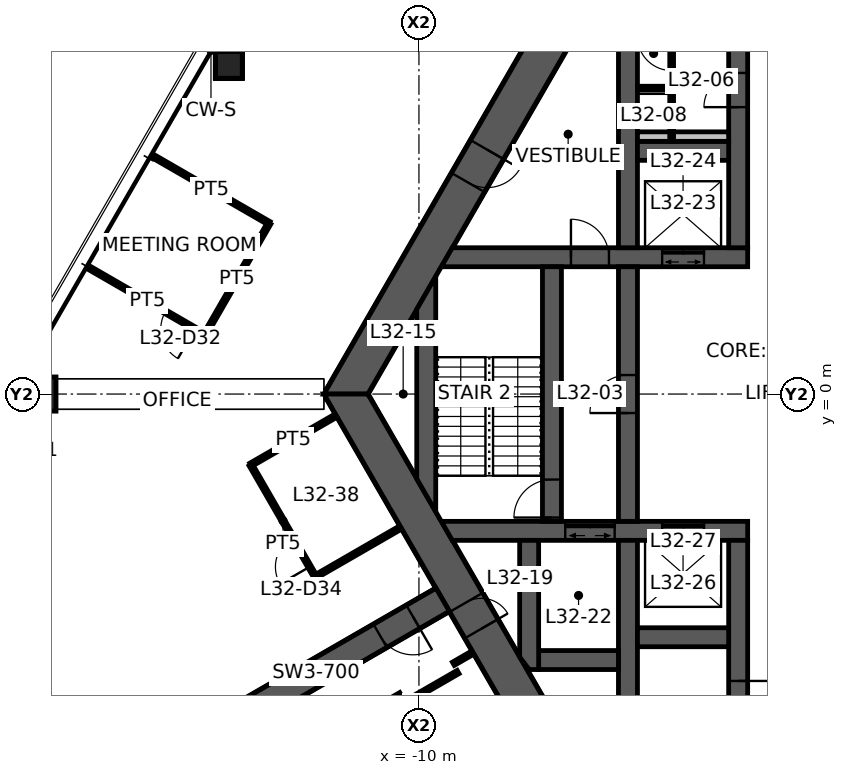
"""IFC4 building model, lengths in metres.
Left out: names, types, materials, properties, quantities, classifications, styles, units other than length and angle.
Written with IfcOpenShell. Run it as: python <this file> out.ifc"""

import sys

from ifc_helpers import new_model, si_unit, direction, frame, frame_2d, origin, origin_2d, place, context, subcontext, project, spatial, polyline, rectangle, hollow_rectangle, outline, extrude, element, fill, save


model = new_model("IFC4")
c1 = context("Model", 3, precision=1e-05, world=origin(), true_north=direction((0.0, 1.0)))
c2 = subcontext(c1, "Body", "Model", "MODEL_VIEW")
j1 = project(units=[si_unit("LENGTHUNIT", "METRE"), si_unit("PLANEANGLEUNIT", "RADIAN")], contexts=[c1])
p1 = place(None, origin())
s1 = spatial("IfcSite", under=j1, at=p1, CompositionType="ELEMENT")
p2 = place(p1, origin())
s2 = spatial("IfcBuilding", under=s1, at=p2, CompositionType="ELEMENT")
p3 = place(p2, frame((0.0, 0.0, 128.6)))
s3 = spatial("IfcBuildingStorey", under=s2, at=p3, CompositionType="ELEMENT", Elevation=128.6)
p4 = place(p3, frame((-20.0, 0.0, 0.0), z_axis=(0.0, 0.0, 1.0), x_axis=(1.0, 0.0, 0.0)))
e1 = element("IfcColumn", 1, at=p4, inside=s3, PredefinedType="COLUMN", context=c2, shape_type="SweptSolid", body=[
    extrude(hollow_rectangle(XDim=0.9, YDim=0.9, WallThickness=0.07, at=origin_2d()), origin(), (0.0, 0.0, 1.0), 4.5),
])
p5 = place(p3, frame((-15.0, 8.66, 0.0), z_axis=(0.0, 0.0, 1.0), x_axis=(1.0, 0.0, 0.0)))
e2 = element("IfcColumn", 2, at=p5, inside=s3, PredefinedType="COLUMN", context=c2, shape_type="SweptSolid", body=[
    extrude(hollow_rectangle(XDim=0.7, YDim=0.7, WallThickness=0.036, at=origin_2d()), origin(), (0.0, 0.0, 1.0), 4.5),
])
p6 = place(p3, frame((-5.961, 10.325, 0.0), z_axis=(0.0, 0.0, 1.0), x_axis=(-0.500004296715, -0.866022923061, 0.0)))
e3 = element("IfcWall", 3, at=p6, inside=s3, PredefinedType="SHEAR", context=c2, shape_type="SweptSolid", body=[
    extrude(outline(polyline([(-0.289, -0.5), (4.494, -0.5), (5.494, -0.5), (12.211, -0.5), (11.634, 0.5), (5.494, 0.5), (4.494, 0.5), (0.289, 0.5), (-0.289, -0.5)])), origin(), (0.0, 0.0, 1.0), 4.5),
])
p7 = place(p6, frame((4.494, 0.0, 0.0)))
e4 = element("IfcOpeningElement", 4, at=p7, cuts=e3, PredefinedType="OPENING", context=c2, shape_type="SweptSolid", body=[
    extrude(rectangle(XDim=1.0, YDim=2.1, at=frame_2d((0.5, 1.05))), frame((0.0, 0.51, 0.0), z_axis=(0.0, -1.0, 0.0), x_axis=(1.0, 0.0, 0.0)), (0.0, 0.0, 1.0), 1.02),
])
p8 = place(p3, frame((-11.922, 0.0, 0.0), z_axis=(0.0, 0.0, 1.0), x_axis=(0.500004296715, -0.866022923061, 0.0)))
e5 = element("IfcWall", 5, at=p8, inside=s3, PredefinedType="SHEAR", context=c2, shape_type="SweptSolid", body=[
    extrude(outline(polyline([(-0.289, -0.5), (6.331, -0.5), (7.131, -0.5), (12.211, -0.5), (11.634, 0.5), (7.131, 0.5), (6.331, 0.5), (0.289, 0.5), (-0.289, -0.5)])), origin(), (0.0, 0.0, 1.0), 4.5),
])
p9 = place(p8, frame((6.331, 0.0, 0.0)))
e6 = element("IfcOpeningElement", 6, at=p9, cuts=e5, PredefinedType="OPENING", context=c2, shape_type="SweptSolid", body=[
    extrude(rectangle(XDim=0.8, YDim=2.1, at=frame_2d((0.4, 1.05))), frame((0.0, 0.51, 0.0), z_axis=(0.0, -1.0, 0.0), x_axis=(1.0, 0.0, 0.0)), (0.0, 0.0, 1.0), 1.02),
])
p10 = place(p3, frame((-9.375, -5.413, 0.0), z_axis=(0.0, 0.0, 1.0), x_axis=(-0.866032377459, -0.499987921047, 0.0)))
e7 = element("IfcWall", 7, at=p10, inside=s3, PredefinedType="SHEAR", context=c2, shape_type="SweptSolid", body=[
    extrude(rectangle(XDim=7.696, YDim=0.7, at=frame_2d((3.848, 0.0))), origin(), (0.0, 0.0, 1.0), 4.5),
])
p11 = place(p10, frame((0.9, 0.0, 0.0)))
e8 = element("IfcOpeningElement", 8, at=p11, cuts=e7, PredefinedType="OPENING", context=c2, shape_type="SweptSolid", body=[
    extrude(rectangle(XDim=1.0, YDim=2.1, at=frame_2d((0.5, 1.05))), frame((0.0, 0.36, 0.0), z_axis=(0.0, -1.0, 0.0), x_axis=(1.0, 0.0, 0.0)), (0.0, 0.0, 1.0), 0.72),
])
p12 = place(p3, frame((-9.266, 3.6, 0.0), z_axis=(0.0, 0.0, 1.0), x_axis=(1.0, 0.0, 0.0)))
e9 = element("IfcWall", 9, at=p12, inside=s3, PredefinedType="SHEAR", context=c2, shape_type="SweptSolid", body=[
    extrude(outline(polyline([(-0.144, -0.25), (3.266, -0.25), (4.266, -0.25), (5.667, -0.25), (6.767, -0.25), (7.916, -0.25), (7.916, 0.25), (6.767, 0.25), (5.667, 0.25), (4.266, 0.25), (3.266, 0.25), (0.144, 0.25), (-0.144, -0.25)])), origin(), (0.0, 0.0, 1.0), 4.5),
])
p13 = place(p12, frame((3.266, 0.0, 0.0)))
e10 = element("IfcOpeningElement", 10, at=p13, cuts=e9, PredefinedType="OPENING", context=c2, shape_type="SweptSolid", body=[
    extrude(rectangle(XDim=1.0, YDim=2.1, at=frame_2d((0.5, 1.05))), frame((0.0, 0.26, 0.0), z_axis=(0.0, -1.0, 0.0), x_axis=(1.0, 0.0, 0.0)), (0.0, 0.0, 1.0), 0.52),
])
p14 = place(p12, frame((5.667, 0.0, 0.0)))
e11 = element("IfcOpeningElement", 11, at=p14, cuts=e9, PredefinedType="OPENING", context=c2, shape_type="SweptSolid", body=[
    extrude(rectangle(XDim=1.1, YDim=2.1, at=frame_2d((0.55, 1.05))), frame((0.0, 0.26, 0.0), z_axis=(0.0, -1.0, 0.0), x_axis=(1.0, 0.0, 0.0)), (0.0, 0.0, 1.0), 0.52),
])
p15 = place(p3, frame((-9.266, -3.6, 0.0), z_axis=(0.0, 0.0, 1.0), x_axis=(1.0, 0.0, 0.0)))
e12 = element("IfcWall", 12, at=p15, inside=s3, PredefinedType="SHEAR", context=c2, shape_type="SweptSolid", body=[
    extrude(outline(polyline([(0.144, -0.25), (3.116, -0.25), (4.417, -0.25), (5.667, -0.25), (6.767, -0.25), (7.916, -0.25), (7.916, 0.25), (6.767, 0.25), (5.667, 0.25), (4.417, 0.25), (3.116, 0.25), (-0.144, 0.25), (0.144, -0.25)])), origin(), (0.0, 0.0, 1.0), 4.5),
])
p16 = place(p15, frame((5.667, 0.0, 0.0)))
e13 = element("IfcOpeningElement", 13, at=p16, cuts=e12, PredefinedType="OPENING", context=c2, shape_type="SweptSolid", body=[
    extrude(rectangle(XDim=1.1, YDim=2.1, at=frame_2d((0.55, 1.05))), frame((0.0, 0.26, 0.0), z_axis=(0.0, -1.0, 0.0), x_axis=(1.0, 0.0, 0.0)), (0.0, 0.0, 1.0), 0.52),
])
p17 = place(p15, frame((3.116, 0.0, 0.0)))
e14 = element("IfcOpeningElement", 14, at=p17, cuts=e12, PredefinedType="OPENING", context=c2, shape_type="SweptSolid", body=[
    extrude(rectangle(XDim=1.3, YDim=2.1, at=frame_2d((0.65, 1.05))), frame((0.0, 0.26, 0.0), z_axis=(0.0, -1.0, 0.0), x_axis=(1.0, 0.0, 0.0)), (0.0, 0.0, 1.0), 0.52),
])
p18 = place(p3, frame((-1.6, 3.85, 0.0), z_axis=(0.0, 0.0, 1.0), x_axis=(0.0, 1.0, 0.0)))
e15 = element("IfcWall", 15, at=p18, inside=s3, PredefinedType="SHEAR", context=c2, shape_type="SweptSolid", body=[
    extrude(rectangle(XDim=5.975, YDim=0.5, at=frame_2d((2.987, 0.0))), origin(), (0.0, 0.0, 1.0), 4.5),
])
p19 = place(p18, frame((3.7, 0.0, 0.0)))
e16 = element("IfcOpeningElement", 16, at=p19, cuts=e15, PredefinedType="OPENING", context=c2, shape_type="SweptSolid", body=[
    extrude(rectangle(XDim=0.9, YDim=2.1, at=frame_2d((0.45, 1.05))), frame((0.0, 0.26, 0.0), z_axis=(0.0, -1.0, 0.0), x_axis=(1.0, 0.0, 0.0)), (0.0, 0.0, 1.0), 0.52),
])
p20 = place(p3, frame((-1.6, -3.85, 0.0), z_axis=(0.0, 0.0, 1.0), x_axis=(0.0, -1.0, 0.0)))
e17 = element("IfcWall", 17, at=p20, inside=s3, PredefinedType="SHEAR", context=c2, shape_type="SweptSolid", body=[
    extrude(rectangle(XDim=5.975, YDim=0.5, at=frame_2d((2.987, 0.0))), origin(), (0.0, 0.0, 1.0), 4.5),
])
p21 = place(p20, frame((3.7, 0.0, 0.0)))
e18 = element("IfcOpeningElement", 18, at=p21, cuts=e17, PredefinedType="OPENING", context=c2, shape_type="SweptSolid", body=[
    extrude(rectangle(XDim=0.9, YDim=2.1, at=frame_2d((0.45, 1.05))), frame((0.0, 0.26, 0.0), z_axis=(0.0, -1.0, 0.0), x_axis=(1.0, 0.0, 0.0)), (0.0, 0.0, 1.0), 0.52),
])
p22 = place(p3, frame((-4.5, -3.35, 0.0), z_axis=(0.0, 0.0, 1.0), x_axis=(0.0, 1.0, 0.0)))
e19 = element("IfcWall", 19, at=p22, inside=s3, PredefinedType="SHEAR", context=c2, shape_type="SweptSolid", body=[
    extrude(rectangle(XDim=6.7, YDim=0.5, at=frame_2d((3.35, 0.0))), origin(), (0.0, 0.0, 1.0), 4.5),
])
p23 = place(p22, frame((2.85, 0.0, 0.0)))
e20 = element("IfcOpeningElement", 20, at=p23, cuts=e19, PredefinedType="OPENING", context=c2, shape_type="SweptSolid", body=[
    extrude(rectangle(XDim=1.0, YDim=2.1, at=frame_2d((0.5, 1.05))), frame((0.0, 0.26, 0.0), z_axis=(0.0, -1.0, 0.0), x_axis=(1.0, 0.0, 0.0)), (0.0, 0.0, 1.0), 0.52),
])
p24 = place(p3, frame((-6.5, -3.35, 0.0), z_axis=(0.0, 0.0, 1.0), x_axis=(0.0, 1.0, 0.0)))
e21 = element("IfcWall", 21, at=p24, inside=s3, PredefinedType="SHEAR", context=c2, shape_type="SweptSolid", body=[
    extrude(rectangle(XDim=6.7, YDim=0.5, at=frame_2d((3.35, 0.0))), origin(), (0.0, 0.0, 1.0), 4.5),
])
p25 = place(p24, frame((0.1, 0.0, 0.0)))
e22 = element("IfcOpeningElement", 22, at=p25, cuts=e21, PredefinedType="OPENING", context=c2, shape_type="SweptSolid", body=[
    extrude(rectangle(XDim=1.0, YDim=2.1, at=frame_2d((0.5, 1.05))), frame((0.0, 0.26, 0.0), z_axis=(0.0, -1.0, 0.0), x_axis=(1.0, 0.0, 0.0)), (0.0, 0.0, 1.0), 0.52),
])
for number, where, z_axis, x_axis in (
    (23, (-4.5, 3.85, 0.0), (0.0, 0.0, 1.0), (0.0, 1.0, 0.0)),
    (24, (-4.5, -3.85, 0.0), (0.0, 0.0, 1.0), (0.0, -1.0, 0.0)),
):
    element("IfcWall", number, at=place(p3, frame(where, z_axis=z_axis, x_axis=x_axis)), inside=s3, PredefinedType="SHEAR", context=c2, shape_type="SweptSolid", body=[
        extrude(rectangle(XDim=5.975, YDim=0.5, at=frame_2d((2.987, 0.0))), origin(), (0.0, 0.0, 1.0), 4.5),
    ])
for number, where, z_axis, x_axis in (
    (25, (-4.25, 6.4, 0.0), (0.0, 0.0, 1.0), (1.0, 0.0, 0.0)),
    (26, (-4.25, -6.4, 0.0), (0.0, 0.0, 1.0), (1.0, 0.0, 0.0)),
):
    element("IfcWall", number, at=place(p3, frame(where, z_axis=z_axis, x_axis=x_axis)), inside=s3, PredefinedType="SHEAR", context=c2, shape_type="SweptSolid", body=[
        extrude(rectangle(XDim=2.4, YDim=0.5, at=frame_2d((1.2, 0.0))), origin(), (0.0, 0.0, 1.0), 4.5),
    ])
p26 = place(p3, frame((-6.85, -7.0, 0.0), z_axis=(0.0, 0.0, 1.0), x_axis=(1.0, 0.0, 0.0)))
e27 = element("IfcWall", 27, at=p26, inside=s3, PredefinedType="SHEAR", context=c2, shape_type="SweptSolid", body=[
    extrude(rectangle(XDim=2.1, YDim=0.5, at=frame_2d((1.05, 0.0))), origin(), (0.0, 0.0, 1.0), 4.5),
])
p27 = place(p3, frame((-7.1, -3.85, 0.0), z_axis=(0.0, 0.0, 1.0), x_axis=(0.0, -1.0, 0.0)))
e28 = element("IfcWall", 28, at=p27, inside=s3, PredefinedType="SHEAR", context=c2, shape_type="SweptSolid", body=[
    extrude(outline(polyline([(0.0, -0.25), (3.069, -0.25), (3.4, 0.0), (3.4, 0.25), (0.0, 0.25), (0.0, -0.25)])), origin(), (0.0, 0.0, 1.0), 4.5),
])
p28 = place(p3, frame((-9.808, -2.662, 0.0), z_axis=(0.0, 0.0, 1.0), x_axis=(0.0, 1.0, 0.0)))
e29 = element("IfcWall", 29, at=p28, inside=s3, PredefinedType="SHEAR", context=c2, shape_type="SweptSolid", body=[
    extrude(outline(polyline([(-0.433, -0.25), (5.758, -0.25), (4.892, 0.25), (0.433, 0.25), (-0.433, -0.25)])), origin(), (0.0, 0.0, 1.0), 4.5),
])
p29 = place(p3, frame((-4.25, 6.775, 0.0), z_axis=(0.0, 0.0, 1.0), x_axis=(1.0, 0.0, 0.0)))
e30 = element("IfcWall", 30, at=p29, inside=s3, PredefinedType="PLUMBINGWALL", context=c2, shape_type="SweptSolid", body=[
    extrude(rectangle(XDim=2.4, YDim=0.25, at=frame_2d((1.2, 0.0))), origin(), (0.0, 0.0, 1.0), 4.5),
])
p30 = place(p3, frame((-3.35, 6.65, 0.0), z_axis=(0.0, 0.0, 1.0), x_axis=(0.0, 1.0, 0.0)))
e31 = element("IfcWall", 31, at=p30, inside=s3, PredefinedType="PARTITIONING", context=c2, shape_type="SweptSolid", body=[
    extrude(rectangle(XDim=3.175, YDim=0.1, at=frame_2d((1.587, 0.0))), origin(), (0.0, 0.0, 1.0), 3.55),
])
p31 = place(p30, frame((1.863, 0.0, 0.0)))
e32 = element("IfcOpeningElement", 32, at=p31, cuts=e31, PredefinedType="OPENING", context=c2, shape_type="SweptSolid", body=[
    extrude(rectangle(XDim=0.9, YDim=2.1, at=frame_2d((0.45, 1.05))), frame((0.0, 0.06, 0.0), z_axis=(0.0, -1.0, 0.0), x_axis=(1.0, 0.0, 0.0)), (0.0, 0.0, 1.0), 0.12),
])
p32 = place(p30, frame((0.35, 0.0, 0.0)))
e33 = element("IfcOpeningElement", 33, at=p32, cuts=e31, PredefinedType="OPENING", context=c2, shape_type="SweptSolid", body=[
    extrude(rectangle(XDim=0.9, YDim=2.1, at=frame_2d((0.45, 1.05))), frame((0.0, 0.06, 0.0), z_axis=(0.0, -1.0, 0.0), x_axis=(1.0, 0.0, 0.0)), (0.0, 0.0, 1.0), 0.12),
])
p33 = place(p3, frame((-3.4, 8.05, 0.0), z_axis=(0.0, 0.0, 1.0), x_axis=(-1.0, 0.0, 0.0)))
e34 = element("IfcWall", 34, at=p33, inside=s3, PredefinedType="PARTITIONING", context=c2, shape_type="SweptSolid", body=[
    extrude(rectangle(XDim=0.85, YDim=0.1, at=frame_2d((0.425, 0.0))), origin(), (0.0, 0.0, 1.0), 3.55),
])
p34 = place(p3, frame((-16.988, 6.255, 0.0), z_axis=(0.0, 0.0, 1.0), x_axis=(0.866009963213, -0.5000267429, 0.0)))
e35 = element("IfcWall", 35, at=p34, inside=s3, PredefinedType="PARTITIONING", context=c2, shape_type="SweptSolid", body=[
    extrude(rectangle(XDim=3.519, YDim=0.1, at=frame_2d((1.759, 0.0))), origin(), (0.0, 0.0, 1.0), 3.55),
])
p35 = place(p3, frame((-15.633, 1.565, 0.0), z_axis=(0.0, 0.0, 1.0), x_axis=(-0.866034097932, 0.499984940993, 0.0)))
e36 = element("IfcWall", 36, at=p35, inside=s3, PredefinedType="PARTITIONING", context=c2, shape_type="SweptSolid", body=[
    extrude(rectangle(XDim=3.489, YDim=0.1, at=frame_2d((1.744, 0.0))), origin(), (0.0, 0.0, 1.0), 3.55),
])
p36 = place(p35, frame((0.3, 0.0, 0.0)))
e37 = element("IfcOpeningElement", 37, at=p36, cuts=e36, PredefinedType="OPENING", context=c2, shape_type="SweptSolid", body=[
    extrude(rectangle(XDim=0.9, YDim=2.1, at=frame_2d((0.45, 1.05))), frame((0.0, 0.06, 0.0), z_axis=(0.0, -1.0, 0.0), x_axis=(1.0, 0.0, 0.0)), (0.0, 0.0, 1.0), 0.12),
])
p37 = place(p3, frame((-13.941, 4.495, 0.0), z_axis=(0.0, 0.0, 1.0), x_axis=(-0.500003502126, -0.866023381821, 0.0)))
e38 = element("IfcWall", 38, at=p37, inside=s3, PredefinedType="PARTITIONING", context=c2, shape_type="SweptSolid", body=[
    extrude(rectangle(XDim=3.384, YDim=0.1, at=frame_2d((1.692, 0.0))), origin(), (0.0, 0.0, 1.0), 3.55),
])
p38 = place(p3, frame((-14.427, -1.863, 0.0), z_axis=(0.0, 0.0, 1.0), x_axis=(0.866045356598, 0.49996543912, 0.0)))
e39 = element("IfcWall", 39, at=p38, inside=s3, PredefinedType="PARTITIONING", context=c2, shape_type="SweptSolid", body=[
    extrude(rectangle(XDim=2.58, YDim=0.1, at=frame_2d((1.29, 0.0))), origin(), (0.0, 0.0, 1.0), 3.55),
])
p39 = place(p3, frame((-12.726, -4.807, 0.0), z_axis=(0.0, 0.0, 1.0), x_axis=(-0.500062241894, 0.865989465428, 0.0)))
e40 = element("IfcWall", 40, at=p39, inside=s3, PredefinedType="PARTITIONING", context=c2, shape_type="SweptSolid", body=[
    extrude(rectangle(XDim=3.4, YDim=0.1, at=frame_2d((1.7, 0.0))), origin(), (0.0, 0.0, 1.0), 3.55),
])
p40 = place(p39, frame((0.3, 0.0, 0.0)))
e41 = element("IfcOpeningElement", 41, at=p40, cuts=e40, PredefinedType="OPENING", context=c2, shape_type="SweptSolid", body=[
    extrude(rectangle(XDim=0.9, YDim=2.1, at=frame_2d((0.45, 1.05))), frame((0.0, 0.06, 0.0), z_axis=(0.0, -1.0, 0.0), x_axis=(1.0, 0.0, 0.0)), (0.0, 0.0, 1.0), 0.12),
])
p41 = place(p3, frame((-10.492, -3.517, 0.0), z_axis=(0.0, 0.0, 1.0), x_axis=(-0.866021702275, -0.500006411147, 0.0)))
e42 = element("IfcWall", 42, at=p41, inside=s3, PredefinedType="PARTITIONING", context=c2, shape_type="SweptSolid", body=[
    extrude(rectangle(XDim=2.58, YDim=0.1, at=frame_2d((1.29, 0.0))), origin(), (0.0, 0.0, 1.0), 3.55),
])
p42 = place(p3, frame((-11.0, -8.198, 0.0), z_axis=(0.0, 0.0, 1.0), x_axis=(0.866131372301, 0.499816412211, 0.0)))
e43 = element("IfcWall", 43, at=p42, inside=s3, PredefinedType="PARTITIONING", context=c2, shape_type="SweptSolid", body=[
    extrude(rectangle(XDim=0.6, YDim=0.1, at=frame_2d((0.3, 0.0))), origin(), (0.0, 0.0, 1.0), 3.55),
])
p43 = place(p3, frame((-10.355, -8.115, 0.0), z_axis=(0.0, 0.0, 1.0), x_axis=(0.866094119867, 0.499880961361, 0.0)))
e44 = element("IfcWall", 44, at=p43, inside=s3, PredefinedType="PARTITIONING", context=c2, shape_type="SweptSolid", body=[
    extrude(rectangle(XDim=1.6, YDim=0.1, at=frame_2d((0.8, 0.0))), origin(), (0.0, 0.0, 1.0), 3.55),
])
p44 = place(p3, frame((-9.094, -7.098, 0.0), z_axis=(0.0, 0.0, 1.0), x_axis=(0.865954211699, 0.50012328804, 0.0)))
e45 = element("IfcWall", 45, at=p44, inside=s3, PredefinedType="PARTITIONING", context=c2, shape_type="SweptSolid", body=[
    extrude(rectangle(XDim=0.58, YDim=0.1, at=frame_2d((0.29, 0.0))), origin(), (0.0, 0.0, 1.0), 3.55),
])
p45 = place(p9, origin())
e46 = element("IfcDoor", 46, at=p45, inside=s3, OperationType="SINGLE_SWING_RIGHT", PredefinedType="DOOR", context=c2, shape_type="SweptSolid", body=[
    extrude(rectangle(XDim=0.8, YDim=2.1, at=frame_2d((0.4, 1.05))), frame((0.0, 0.025, 0.0), z_axis=(0.0, -1.0, 0.0), x_axis=(1.0, 0.0, 0.0)), (0.0, 0.0, 1.0), 0.05),
])
fill(e6, e46)
p46 = place(p7, origin())
e47 = element("IfcDoor", 47, at=p46, inside=s3, OperationType="SINGLE_SWING_LEFT", PredefinedType="DOOR", context=c2, shape_type="SweptSolid", body=[
    extrude(rectangle(XDim=1.0, YDim=2.1, at=frame_2d((0.5, 1.05))), frame((0.0, 0.025, 0.0), z_axis=(0.0, -1.0, 0.0), x_axis=(1.0, 0.0, 0.0)), (0.0, 0.0, 1.0), 0.05),
])
fill(e4, e47)
p47 = place(p23, origin())
e48 = element("IfcDoor", 48, at=p47, inside=s3, OperationType="SINGLE_SWING_LEFT", PredefinedType="DOOR", context=c2, shape_type="SweptSolid", body=[
    extrude(rectangle(XDim=1.0, YDim=2.1, at=frame_2d((0.5, 1.05))), frame((0.0, 0.025, 0.0), z_axis=(0.0, -1.0, 0.0), x_axis=(1.0, 0.0, 0.0)), (0.0, 0.0, 1.0), 0.05),
])
fill(e20, e48)
p48 = place(p25, origin())
e49 = element("IfcDoor", 49, at=p48, inside=s3, OperationType="SINGLE_SWING_LEFT", PredefinedType="DOOR", context=c2, shape_type="SweptSolid", body=[
    extrude(rectangle(XDim=1.0, YDim=2.1, at=frame_2d((0.5, 1.05))), frame((0.0, 0.025, 0.0), z_axis=(0.0, -1.0, 0.0), x_axis=(1.0, 0.0, 0.0)), (0.0, 0.0, 1.0), 0.05),
])
fill(e22, e49)
p49 = place(p13, origin())
e50 = element("IfcDoor", 50, at=p49, inside=s3, OperationType="SINGLE_SWING_LEFT", PredefinedType="DOOR", context=c2, shape_type="SweptSolid", body=[
    extrude(rectangle(XDim=1.0, YDim=2.1, at=frame_2d((0.5, 1.05))), frame((0.0, 0.025, 0.0), z_axis=(0.0, -1.0, 0.0), x_axis=(1.0, 0.0, 0.0)), (0.0, 0.0, 1.0), 0.05),
])
fill(e10, e50)
p50 = place(p19, origin())
e51 = element("IfcDoor", 51, at=p50, inside=s3, OperationType="SINGLE_SWING_LEFT", PredefinedType="DOOR", context=c2, shape_type="SweptSolid", body=[
    extrude(rectangle(XDim=0.9, YDim=2.1, at=frame_2d((0.45, 1.05))), frame((0.0, 0.025, 0.0), z_axis=(0.0, -1.0, 0.0), x_axis=(1.0, 0.0, 0.0)), (0.0, 0.0, 1.0), 0.05),
])
fill(e16, e51)
p51 = place(p21, origin())
e52 = element("IfcDoor", 52, at=p51, inside=s3, OperationType="SINGLE_SWING_LEFT", PredefinedType="DOOR", context=c2, shape_type="SweptSolid", body=[
    extrude(rectangle(XDim=0.9, YDim=2.1, at=frame_2d((0.45, 1.05))), frame((0.0, 0.025, 0.0), z_axis=(0.0, -1.0, 0.0), x_axis=(1.0, 0.0, 0.0)), (0.0, 0.0, 1.0), 0.05),
])
fill(e18, e52)
p52 = place(p11, origin())
e53 = element("IfcDoor", 53, at=p52, inside=s3, OperationType="SINGLE_SWING_LEFT", PredefinedType="DOOR", context=c2, shape_type="SweptSolid", body=[
    extrude(rectangle(XDim=1.0, YDim=2.1, at=frame_2d((0.5, 1.05))), frame((0.0, 0.025, 0.0), z_axis=(0.0, -1.0, 0.0), x_axis=(1.0, 0.0, 0.0)), (0.0, 0.0, 1.0), 0.05),
])
fill(e8, e53)
p53 = place(p31, origin())
e54 = element("IfcDoor", 54, at=p53, inside=s3, OperationType="SINGLE_SWING_RIGHT", PredefinedType="DOOR", context=c2, shape_type="SweptSolid", body=[
    extrude(rectangle(XDim=0.9, YDim=2.1, at=frame_2d((0.45, 1.05))), frame((0.0, 0.025, 0.0), z_axis=(0.0, -1.0, 0.0), x_axis=(1.0, 0.0, 0.0)), (0.0, 0.0, 1.0), 0.05),
])
fill(e32, e54)
p54 = place(p32, origin())
e55 = element("IfcDoor", 55, at=p54, inside=s3, OperationType="SINGLE_SWING_RIGHT", PredefinedType="DOOR", context=c2, shape_type="SweptSolid", body=[
    extrude(rectangle(XDim=0.9, YDim=2.1, at=frame_2d((0.45, 1.05))), frame((0.0, 0.025, 0.0), z_axis=(0.0, -1.0, 0.0), x_axis=(1.0, 0.0, 0.0)), (0.0, 0.0, 1.0), 0.05),
])
fill(e33, e55)
p55 = place(p36, origin())
e56 = element("IfcDoor", 56, at=p55, inside=s3, OperationType="SINGLE_SWING_LEFT", PredefinedType="DOOR", context=c2, shape_type="SweptSolid", body=[
    extrude(rectangle(XDim=0.9, YDim=2.1, at=frame_2d((0.45, 1.05))), frame((0.0, 0.025, 0.0), z_axis=(0.0, -1.0, 0.0), x_axis=(1.0, 0.0, 0.0)), (0.0, 0.0, 1.0), 0.05),
])
fill(e37, e56)
p56 = place(p40, origin())
e57 = element("IfcDoor", 57, at=p56, inside=s3, OperationType="SINGLE_SWING_LEFT", PredefinedType="DOOR", context=c2, shape_type="SweptSolid", body=[
    extrude(rectangle(XDim=0.9, YDim=2.1, at=frame_2d((0.45, 1.05))), frame((0.0, 0.025, 0.0), z_axis=(0.0, -1.0, 0.0), x_axis=(1.0, 0.0, 0.0)), (0.0, 0.0, 1.0), 0.05),
])
fill(e41, e57)
p57 = place(p14, origin())
e58 = element("IfcDoor", 58, at=p57, inside=s3, OperationType="DOUBLE_DOOR_SLIDING", PredefinedType="DOOR", context=c2, shape_type="SweptSolid", body=[
    extrude(rectangle(XDim=1.1, YDim=2.1, at=frame_2d((0.55, 1.05))), frame((0.0, 0.025, 0.0), z_axis=(0.0, -1.0, 0.0), x_axis=(1.0, 0.0, 0.0)), (0.0, 0.0, 1.0), 0.05),
])
fill(e11, e58)
p58 = place(p16, origin())
e59 = element("IfcDoor", 59, at=p58, inside=s3, OperationType="DOUBLE_DOOR_SLIDING", PredefinedType="DOOR", context=c2, shape_type="SweptSolid", body=[
    extrude(rectangle(XDim=1.1, YDim=2.1, at=frame_2d((0.55, 1.05))), frame((0.0, 0.025, 0.0), z_axis=(0.0, -1.0, 0.0), x_axis=(1.0, 0.0, 0.0)), (0.0, 0.0, 1.0), 0.05),
])
fill(e13, e59)
p59 = place(p17, origin())
e60 = element("IfcDoor", 60, at=p59, inside=s3, OperationType="DOUBLE_DOOR_SLIDING", PredefinedType="DOOR", context=c2, shape_type="SweptSolid", body=[
    extrude(rectangle(XDim=1.3, YDim=2.1, at=frame_2d((0.65, 1.05))), frame((0.0, 0.025, 0.0), z_axis=(0.0, -1.0, 0.0), x_axis=(1.0, 0.0, 0.0)), (0.0, 0.0, 1.0), 0.05),
])
fill(e14, e60)
save(model, sys.argv[1])
